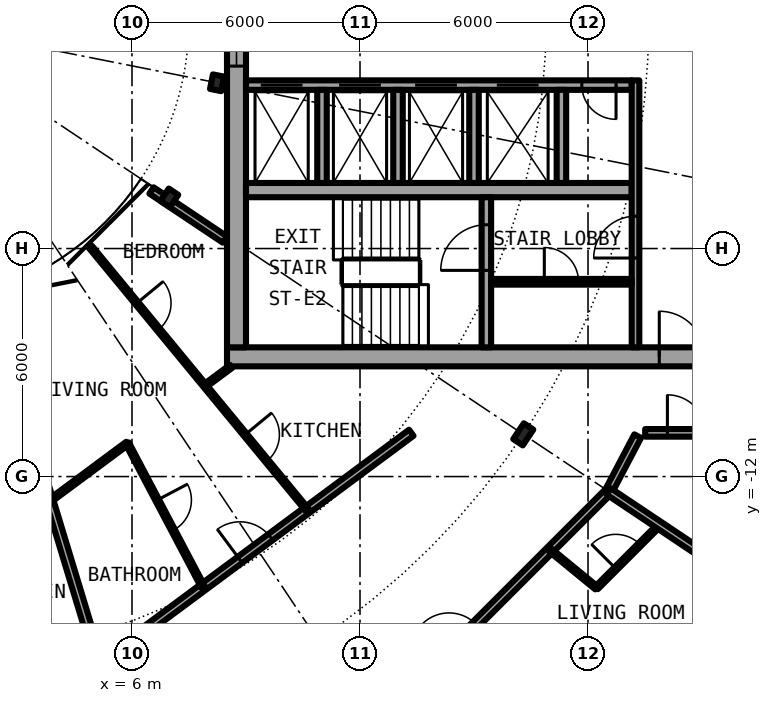
"""IFC4 building model, lengths in metres.
Left out: names, types, materials, properties, quantities, classifications, styles, units other than length and angle.
Written with IfcOpenShell. Run it as: python <this file> out.ifc"""

import sys

from ifc_helpers import new_model, si_unit, direction, frame, frame_2d, origin, origin_2d, place, context, subcontext, project, spatial, rectangle, i_section, extrude, element, fill, save


model = new_model("IFC4")
c1 = context("Model", 3, precision=1e-05, world=origin(), true_north=direction((0.0, 1.0)))
c2 = subcontext(c1, "Body", "Model", "MODEL_VIEW")
j1 = project(units=[si_unit("LENGTHUNIT", "METRE"), si_unit("PLANEANGLEUNIT", "RADIAN")], contexts=[c1])
p1 = place(None, origin())
s1 = spatial("IfcSite", under=j1, at=p1, CompositionType="ELEMENT")
p2 = place(p1, origin())
s2 = spatial("IfcBuilding", under=s1, at=p2, CompositionType="ELEMENT")
p3 = place(p2, frame((0.0, 0.0, 167.7)))
s3 = spatial("IfcBuildingStorey", under=s2, at=p3, CompositionType="ELEMENT", Elevation=167.7)
p4 = place(p3, frame((16.297, -10.889, 0.0), z_axis=(0.0, 0.0, 1.0), x_axis=(0.831469612303, -0.55557023302, 0.0)))
e1 = element("IfcColumn", 1, at=p4, inside=s3, PredefinedType="COLUMN", context=c2, shape_type="SweptSolid", body=[
    extrude(i_section(OverallWidth=0.3, OverallDepth=0.5, WebThickness=0.014, FlangeThickness=0.028, FilletRadius=0.027, at=origin_2d()), origin(), (0.0, 0.0, 1.0), 3.05),
])
for number, where, z_axis, x_axis in (
    (2, (6.984, -4.667, 0.0), (0.0, 0.0, 1.0), (0.831, -0.556, 0.0)),
    (3, (8.239, -1.639, 0.0), (0.0, 0.0, 1.0), (0.981, -0.195, 0.0)),
):
    element("IfcColumn", number, at=place(p3, frame(where, z_axis=z_axis, x_axis=x_axis)), inside=s3, PredefinedType="COLUMN", context=c2, shape_type="SweptSolid", body=[
        extrude(i_section(OverallWidth=0.3, OverallDepth=0.39, WebThickness=0.011, FlangeThickness=0.019, FilletRadius=0.027, at=origin_2d()), origin(), (0.0, 0.0, 1.0), 3.05),
    ])
p5 = place(p3, frame((19.304, -19.304, 0.0), z_axis=(0.0, 0.0, 1.0), x_axis=(0.634382322723, 0.773019449054, 0.0)))
e4 = element("IfcWall", 4, at=p5, inside=s3, PredefinedType="SOLIDWALL", context=c2, shape_type="SweptSolid", body=[
    extrude(rectangle(XDim=5.352, YDim=0.25, at=frame_2d((2.676, 0.0))), origin(), (0.0, 0.0, 1.0), 2.7),
])
p6 = place(p5, frame((0.441, 0.0, 0.3)))
e5 = element("IfcOpeningElement", 5, at=p6, cuts=e4, PredefinedType="OPENING", context=c2, shape_type="SweptSolid", body=[
    extrude(rectangle(XDim=1.8, YDim=2.1, at=frame_2d((0.9, 1.05))), frame((0.0, 0.135, 0.0), z_axis=(0.0, -1.0, 0.0), x_axis=(1.0, 0.0, 0.0)), (0.0, 0.0, 1.0), 0.27),
])
p7 = place(p5, frame((3.51, 0.0, 0.0)))
e6 = element("IfcOpeningElement", 6, at=p7, cuts=e4, PredefinedType="OPENING", context=c2, shape_type="SweptSolid", body=[
    extrude(rectangle(XDim=1.0, YDim=2.2, at=frame_2d((0.5, 1.1))), frame((0.0, 0.135, 0.0), z_axis=(0.0, -1.0, 0.0), x_axis=(1.0, 0.0, 0.0)), (0.0, 0.0, 1.0), 0.27),
])
p8 = place(p3, frame((8.5, -8.85, 0.0), z_axis=(0.0, 0.0, 1.0), x_axis=(1.0, 0.0, 0.0)))
e7 = element("IfcWall", 7, at=p8, inside=s3, PredefinedType="SHEAR", context=c2, shape_type="SweptSolid", body=[
    extrude(rectangle(XDim=13.6, YDim=0.5, at=frame_2d((6.8, 0.0))), origin(), (0.0, 0.0, 1.0), 3.05),
])
p9 = place(p8, frame((11.375, 0.0, 0.0)))
e8 = element("IfcOpeningElement", 8, at=p9, cuts=e7, PredefinedType="OPENING", context=c2, shape_type="SweptSolid", body=[
    extrude(rectangle(XDim=1.2, YDim=2.3, at=frame_2d((0.6, 1.15))), frame((0.0, 0.26, 0.0), z_axis=(0.0, -1.0, 0.0), x_axis=(1.0, 0.0, 0.0)), (0.0, 0.0, 1.0), 0.52),
])
p10 = place(p3, frame((8.75, -8.6, 0.0), z_axis=(0.0, 0.0, 1.0), x_axis=(0.0, 1.0, 0.0)))
e9 = element("IfcWall", 9, at=p10, inside=s3, PredefinedType="SHEAR", context=c2, shape_type="SweptSolid", body=[
    extrude(rectangle(XDim=17.2, YDim=0.5, at=frame_2d((8.6, 0.0))), origin(), (0.0, 0.0, 1.0), 3.05),
])
p11 = place(p10, frame((7.4, 0.0, 0.1)))
e10 = element("IfcOpeningElement", 10, at=p11, cuts=e9, PredefinedType="OPENING", context=c2, shape_type="SweptSolid", body=[
    extrude(rectangle(XDim=2.4, YDim=2.2, at=frame_2d((1.2, 1.1))), frame((0.0, 0.26, 0.0), z_axis=(0.0, -1.0, 0.0), x_axis=(1.0, 0.0, 0.0)), (0.0, 0.0, 1.0), 0.52),
])
p12 = place(p3, frame((19.15, -1.7, 0.0), z_axis=(0.0, 0.0, 1.0), x_axis=(-1.0, 0.0, 0.0)))
e11 = element("IfcWall", 11, at=p12, inside=s3, PredefinedType="SHEAR", context=c2, shape_type="SweptSolid", body=[
    extrude(rectangle(XDim=10.15, YDim=0.25, at=frame_2d((5.075, 0.0))), origin(), (0.0, 0.0, 1.0), 3.05),
])
p13 = place(p12, frame((8.663, 0.0, 0.0)))
e12 = element("IfcOpeningElement", 12, at=p13, cuts=e11, PredefinedType="OPENING", context=c2, shape_type="SweptSolid", body=[
    extrude(rectangle(XDim=1.1, YDim=2.3, at=frame_2d((0.55, 1.15))), frame((0.0, 0.135, 0.0), z_axis=(0.0, -1.0, 0.0), x_axis=(1.0, 0.0, 0.0)), (0.0, 0.0, 1.0), 0.27),
])
p14 = place(p12, frame((6.6, 0.0, 0.0)))
e13 = element("IfcOpeningElement", 13, at=p14, cuts=e11, PredefinedType="OPENING", context=c2, shape_type="SweptSolid", body=[
    extrude(rectangle(XDim=1.1, YDim=2.3, at=frame_2d((0.55, 1.15))), frame((0.0, 0.135, 0.0), z_axis=(0.0, -1.0, 0.0), x_axis=(1.0, 0.0, 0.0)), (0.0, 0.0, 1.0), 0.27),
])
p15 = place(p12, frame((4.6, 0.0, 0.0)))
e14 = element("IfcOpeningElement", 14, at=p15, cuts=e11, PredefinedType="OPENING", context=c2, shape_type="SweptSolid", body=[
    extrude(rectangle(XDim=1.1, YDim=2.3, at=frame_2d((0.55, 1.15))), frame((0.0, 0.135, 0.0), z_axis=(0.0, -1.0, 0.0), x_axis=(1.0, 0.0, 0.0)), (0.0, 0.0, 1.0), 0.27),
])
p16 = place(p12, frame((2.45, 0.0, 0.0)))
e15 = element("IfcOpeningElement", 15, at=p16, cuts=e11, PredefinedType="OPENING", context=c2, shape_type="SweptSolid", body=[
    extrude(rectangle(XDim=1.1, YDim=2.3, at=frame_2d((0.55, 1.15))), frame((0.0, 0.135, 0.0), z_axis=(0.0, -1.0, 0.0), x_axis=(1.0, 0.0, 0.0)), (0.0, 0.0, 1.0), 0.27),
])
p17 = place(p12, frame((0.413, 0.0, 0.0)))
e16 = element("IfcOpeningElement", 16, at=p17, cuts=e11, PredefinedType="OPENING", context=c2, shape_type="SweptSolid", body=[
    extrude(rectangle(XDim=0.9, YDim=2.3, at=frame_2d((0.45, 1.15))), frame((0.0, 0.135, 0.0), z_axis=(0.0, -1.0, 0.0), x_axis=(1.0, 0.0, 0.0)), (0.0, 0.0, 1.0), 0.27),
])
p18 = place(p3, frame((9.0, -4.462, 0.0), z_axis=(0.0, 0.0, 1.0), x_axis=(1.0, 0.0, 0.0)))
e17 = element("IfcWall", 17, at=p18, inside=s3, PredefinedType="SHEAR", context=c2, shape_type="SweptSolid", body=[
    extrude(rectangle(XDim=10.15, YDim=0.375, at=frame_2d((5.075, 0.0))), origin(), (0.0, 0.0, 1.0), 3.05),
])
p19 = place(p3, frame((15.325, -8.6, 0.0), z_axis=(0.0, 0.0, 1.0), x_axis=(0.0, 1.0, 0.0)))
e18 = element("IfcWall", 18, at=p19, inside=s3, PredefinedType="SHEAR", context=c2, shape_type="SweptSolid", body=[
    extrude(rectangle(XDim=3.95, YDim=0.25, at=frame_2d((1.975, 0.0))), origin(), (0.0, 0.0, 1.0), 3.05),
])
p20 = place(p19, frame((2.025, 0.0, 0.0)))
e19 = element("IfcOpeningElement", 19, at=p20, cuts=e18, PredefinedType="OPENING", context=c2, shape_type="SweptSolid", body=[
    extrude(rectangle(XDim=1.2, YDim=2.3, at=frame_2d((0.6, 1.15))), frame((0.0, 0.135, 0.0), z_axis=(0.0, -1.0, 0.0), x_axis=(1.0, 0.0, 0.0)), (0.0, 0.0, 1.0), 0.27),
])
for number, where, z_axis, x_axis in (
    (20, (15.0, -1.825, 0.0), (0.0, 0.0, 1.0), (0.0, -1.0, 0.0)),
    (21, (17.3, -1.825, 0.0), (0.0, 0.0, 1.0), (0.0, -1.0, 0.0)),
):
    element("IfcWall", number, at=place(p3, frame(where, z_axis=z_axis, x_axis=x_axis)), inside=s3, PredefinedType="SOLIDWALL", context=c2, shape_type="SweptSolid", body=[
        extrude(rectangle(XDim=2.45, YDim=0.25, at=frame_2d((1.225, 0.0))), origin(), (0.0, 0.0, 1.0), 2.7),
    ])
p21 = place(p3, frame((19.25, -8.6, 0.0), z_axis=(0.0, 0.0, 1.0), x_axis=(0.0, 1.0, 0.0)))
e22 = element("IfcWall", 22, at=p21, inside=s3, PredefinedType="SOLIDWALL", context=c2, shape_type="SweptSolid", body=[
    extrude(rectangle(XDim=7.025, YDim=0.2, at=frame_2d((3.513, 0.0))), origin(), (0.0, 0.0, 1.0), 2.7),
])
p22 = place(p21, frame((2.35, 0.0, 0.0)))
e23 = element("IfcOpeningElement", 23, at=p22, cuts=e22, PredefinedType="OPENING", context=c2, shape_type="SweptSolid", body=[
    extrude(rectangle(XDim=1.1, YDim=2.3, at=frame_2d((0.55, 1.15))), frame((0.0, 0.11, 0.0), z_axis=(0.0, -1.0, 0.0), x_axis=(1.0, 0.0, 0.0)), (0.0, 0.0, 1.0), 0.22),
])
for number, where, z_axis, x_axis in (
    (24, (11.0, -1.825, 0.0), (0.0, 0.0, 1.0), (0.0, -1.0, 0.0)),
    (25, (13.0, -1.825, 0.0), (0.0, 0.0, 1.0), (0.0, -1.0, 0.0)),
):
    element("IfcWall", number, at=place(p3, frame(where, z_axis=z_axis, x_axis=x_axis)), inside=s3, PredefinedType="SOLIDWALL", context=c2, shape_type="SweptSolid", body=[
        extrude(rectangle(XDim=2.45, YDim=0.25, at=frame_2d((1.225, 0.0))), origin(), (0.0, 0.0, 1.0), 2.7),
    ])
p23 = place(p3, frame((15.45, -6.875, 0.0), z_axis=(0.0, 0.0, 1.0), x_axis=(1.0, 0.0, 0.0)))
e26 = element("IfcWall", 26, at=p23, inside=s3, PredefinedType="PARTITIONING", context=c2, shape_type="SweptSolid", body=[
    extrude(rectangle(XDim=3.7, YDim=0.15, at=frame_2d((1.85, 0.0))), origin(), (0.0, 0.0, 1.0), 2.7),
])
p24 = place(p23, frame((1.4, 0.0, 0.0)))
e27 = element("IfcOpeningElement", 27, at=p24, cuts=e26, PredefinedType="OPENING", context=c2, shape_type="SweptSolid", body=[
    extrude(rectangle(XDim=0.9, YDim=2.3, at=frame_2d((0.45, 1.15))), frame((0.0, 0.085, 0.0), z_axis=(0.0, -1.0, 0.0), x_axis=(1.0, 0.0, 0.0)), (0.0, 0.0, 1.0), 0.17),
])
p25 = place(p3, frame((18.224, -14.927, 0.0), z_axis=(0.0, 0.0, 1.0), x_axis=(0.706897299114, 0.707316201218, 0.0)))
e28 = element("IfcWall", 28, at=p25, inside=s3, PredefinedType="PARTITIONING", context=c2, shape_type="SweptSolid", body=[
    extrude(rectangle(XDim=2.331, YDim=0.1, at=frame_2d((1.166, 0.0))), origin(), (0.0, 0.0, 1.0), 2.7),
])
p26 = place(p25, frame((0.716, 0.0, 0.0)))
e29 = element("IfcOpeningElement", 29, at=p26, cuts=e28, PredefinedType="OPENING", context=c2, shape_type="SweptSolid", body=[
    extrude(rectangle(XDim=0.9, YDim=2.3, at=frame_2d((0.45, 1.15))), frame((0.0, 0.06, 0.0), z_axis=(0.0, -1.0, 0.0), x_axis=(1.0, 0.0, 0.0)), (0.0, 0.0, 1.0), 0.12),
])
p27 = place(p3, frame((18.542, -12.389, 0.0), z_axis=(0.0, 0.0, 1.0), x_axis=(0.465605550524, 0.884992356646, 0.0)))
e30 = element("IfcWall", 30, at=p27, inside=s3, PredefinedType="PARTITIONING", context=c2, shape_type="SweptSolid", body=[
    extrude(rectangle(XDim=1.643, YDim=0.2, at=frame_2d((0.821, 0.0))), origin(), (0.0, 0.0, 1.0), 2.7),
])
p28 = place(p3, frame((12.389, -18.542, 0.0), z_axis=(0.0, 0.0, 1.0), x_axis=(0.707106781187, 0.707106781187, 0.0)))
e31 = element("IfcWall", 31, at=p28, inside=s3, PredefinedType="PARTITIONING", context=c2, shape_type="SweptSolid", body=[
    extrude(rectangle(XDim=8.702, YDim=0.2, at=frame_2d((4.351, 0.0))), origin(), (0.0, 0.0, 1.0), 2.7),
])
p29 = place(p28, frame((2.763, 0.0, 0.0)))
e32 = element("IfcOpeningElement", 32, at=p29, cuts=e31, PredefinedType="OPENING", context=c2, shape_type="SweptSolid", body=[
    extrude(rectangle(XDim=1.0, YDim=2.3, at=frame_2d((0.5, 1.15))), frame((0.0, 0.11, 0.0), z_axis=(0.0, -1.0, 0.0), x_axis=(1.0, 0.0, 0.0)), (0.0, 0.0, 1.0), 0.22),
])
p30 = place(p3, frame((5.137, -16.938, 0.0), z_axis=(0.0, 0.0, 1.0), x_axis=(0.803229232922, 0.595670042371, 0.0)))
e33 = element("IfcWall", 33, at=p30, inside=s3, PredefinedType="PARTITIONING", context=c2, shape_type="SweptSolid", body=[
    extrude(rectangle(XDim=10.224, YDim=0.2, at=frame_2d((5.112, 0.0))), origin(), (0.0, 0.0, 1.0), 2.7),
])
p31 = place(p30, frame((4.612, 0.0, 0.0)))
e34 = element("IfcOpeningElement", 34, at=p31, cuts=e33, PredefinedType="OPENING", context=c2, shape_type="SweptSolid", body=[
    extrude(rectangle(XDim=1.0, YDim=2.3, at=frame_2d((0.5, 1.15))), frame((0.0, 0.11, 0.0), z_axis=(0.0, -1.0, 0.0), x_axis=(1.0, 0.0, 0.0)), (0.0, 0.0, 1.0), 0.22),
])
p32 = place(p3, frame((3.835, -12.64, 0.0), z_axis=(0.0, 0.0, 1.0), x_axis=(0.803259509791, 0.595629213463, 0.0)))
e35 = element("IfcWall", 35, at=p32, inside=s3, PredefinedType="PARTITIONING", context=c2, shape_type="SweptSolid", body=[
    extrude(rectangle(XDim=2.543, YDim=0.1, at=frame_2d((1.272, 0.0))), origin(), (0.0, 0.0, 1.0), 2.7),
])
p33 = place(p3, frame((7.919, -9.611, 0.0), z_axis=(0.0, 0.0, 1.0), x_axis=(0.803199066515, 0.595710718007, 0.0)))
e36 = element("IfcWall", 36, at=p33, inside=s3, PredefinedType="PARTITIONING", context=c2, shape_type="SweptSolid", body=[
    extrude(rectangle(XDim=0.858, YDim=0.1, at=frame_2d((0.429, 0.0))), origin(), (0.0, 0.0, 1.0), 2.7),
])
p34 = place(p3, frame((19.504, -10.85, 0.0), z_axis=(0.0, 0.0, 1.0), x_axis=(1.0, 0.0, 0.0)))
e37 = element("IfcWall", 37, at=p34, inside=s3, PredefinedType="PARTITIONING", context=c2, shape_type="SweptSolid", body=[
    extrude(rectangle(XDim=2.171, YDim=0.2, at=frame_2d((1.085, 0.0))), origin(), (0.0, 0.0, 1.0), 2.7),
])
p35 = place(p34, frame((0.585, 0.0, 0.0)))
e38 = element("IfcOpeningElement", 38, at=p35, cuts=e37, PredefinedType="OPENING", context=c2, shape_type="SweptSolid", body=[
    extrude(rectangle(XDim=1.0, YDim=2.3, at=frame_2d((0.5, 1.15))), frame((0.0, 0.11, 0.0), z_axis=(0.0, -1.0, 0.0), x_axis=(1.0, 0.0, 0.0)), (0.0, 0.0, 1.0), 0.22),
])
p36 = place(p3, frame((6.513, -4.472, 0.0), z_axis=(0.0, 0.0, 1.0), x_axis=(0.83133816625, -0.555766905579, 0.0)))
e39 = element("IfcWall", 39, at=p36, inside=s3, PredefinedType="PARTITIONING", context=c2, shape_type="SweptSolid", body=[
    extrude(rectangle(XDim=2.323, YDim=0.2, at=frame_2d((1.162, 0.0))), origin(), (0.0, 0.0, 1.0), 2.7),
])
p37 = place(p3, frame((2.241, -7.388, 0.0), z_axis=(0.0, 0.0, 1.0), x_axis=(0.290284403441, -0.956940418793, 0.0)))
e40 = element("IfcWall", 40, at=p37, inside=s3, PredefinedType="PARTITIONING", context=c2, shape_type="SweptSolid", body=[
    extrude(rectangle(XDim=9.98, YDim=0.2, at=frame_2d((4.99, 0.0))), origin(), (0.0, 0.0, 1.0), 2.7),
])
p38 = place(p3, frame((4.908, -5.959, 0.0), z_axis=(0.0, 0.0, 1.0), x_axis=(0.636115614725, -0.771593756262, 0.0)))
e41 = element("IfcWall", 41, at=p38, inside=s3, PredefinedType="PARTITIONING", context=c2, shape_type="SweptSolid", body=[
    extrude(rectangle(XDim=8.967, YDim=0.1, at=frame_2d((4.483, 0.0))), origin(), (0.0, 0.0, 1.0), 2.7),
])
p39 = place(p38, frame((6.4, 0.0, 0.0)))
e42 = element("IfcOpeningElement", 42, at=p39, cuts=e41, PredefinedType="OPENING", context=c2, shape_type="SweptSolid", body=[
    extrude(rectangle(XDim=0.9, YDim=2.3, at=frame_2d((0.45, 1.15))), frame((0.0, 0.06, 0.0), z_axis=(0.0, -1.0, 0.0), x_axis=(1.0, 0.0, 0.0)), (0.0, 0.0, 1.0), 0.12),
])
p40 = place(p38, frame((1.917, 0.0, 0.0)))
e43 = element("IfcOpeningElement", 43, at=p40, cuts=e41, PredefinedType="OPENING", context=c2, shape_type="SweptSolid", body=[
    extrude(rectangle(XDim=0.9, YDim=2.3, at=frame_2d((0.45, 1.15))), frame((0.0, 0.06, 0.0), z_axis=(0.0, -1.0, 0.0), x_axis=(1.0, 0.0, 0.0)), (0.0, 0.0, 1.0), 0.12),
])
p41 = place(p3, frame((5.875, -11.126, 0.0), z_axis=(0.0, 0.0, 1.0), x_axis=(0.467030118529, -0.884241408432, 0.0)))
e44 = element("IfcWall", 44, at=p41, inside=s3, PredefinedType="PARTITIONING", context=c2, shape_type="SweptSolid", body=[
    extrude(rectangle(XDim=4.278, YDim=0.1, at=frame_2d((2.139, 0.0))), origin(), (0.0, 0.0, 1.0), 2.7),
])
p42 = place(p41, frame((1.689, 0.0, 0.0)))
e45 = element("IfcOpeningElement", 45, at=p42, cuts=e44, PredefinedType="OPENING", context=c2, shape_type="SweptSolid", body=[
    extrude(rectangle(XDim=0.9, YDim=2.3, at=frame_2d((0.45, 1.15))), frame((0.0, 0.06, 0.0), z_axis=(0.0, -1.0, 0.0), x_axis=(1.0, 0.0, 0.0)), (0.0, 0.0, 1.0), 0.12),
])
p43 = place(p3, frame((17.001, -13.93, 0.0), z_axis=(0.0, 0.0, 1.0), x_axis=(0.773633255921, -0.633633636523, 0.0)))
e46 = element("IfcWall", 46, at=p43, inside=s3, PredefinedType="PARTITIONING", context=c2, shape_type="SweptSolid", body=[
    extrude(rectangle(XDim=1.578, YDim=0.1, at=frame_2d((0.789, 0.0))), origin(), (0.0, 0.0, 1.0), 2.7),
])
p44 = place(p3, frame((18.542, -12.389, 0.0), z_axis=(0.0, 0.0, 1.0), x_axis=(0.831387096605, -0.55569370664, 0.0)))
e47 = element("IfcWall", 47, at=p44, inside=s3, PredefinedType="PARTITIONING", context=c2, shape_type="SweptSolid", body=[
    extrude(rectangle(XDim=4.875, YDim=0.2, at=frame_2d((2.438, 0.0))), origin(), (0.0, 0.0, 1.0), 2.7),
])
p45 = place(p13, origin())
e48 = element("IfcDoor", 48, at=p45, inside=s3, OperationType="DOUBLE_DOOR_SLIDING", PredefinedType="DOOR", context=c2, shape_type="SweptSolid", body=[
    extrude(rectangle(XDim=1.1, YDim=2.3, at=frame_2d((0.55, 1.15))), frame((0.0, 0.025, 0.0), z_axis=(0.0, -1.0, 0.0), x_axis=(1.0, 0.0, 0.0)), (0.0, 0.0, 1.0), 0.05),
])
fill(e12, e48)
p46 = place(p14, origin())
e49 = element("IfcDoor", 49, at=p46, inside=s3, OperationType="DOUBLE_DOOR_SLIDING", PredefinedType="DOOR", context=c2, shape_type="SweptSolid", body=[
    extrude(rectangle(XDim=1.1, YDim=2.3, at=frame_2d((0.55, 1.15))), frame((0.0, 0.025, 0.0), z_axis=(0.0, -1.0, 0.0), x_axis=(1.0, 0.0, 0.0)), (0.0, 0.0, 1.0), 0.05),
])
fill(e13, e49)
p47 = place(p15, origin())
e50 = element("IfcDoor", 50, at=p47, inside=s3, OperationType="DOUBLE_DOOR_SLIDING", PredefinedType="DOOR", context=c2, shape_type="SweptSolid", body=[
    extrude(rectangle(XDim=1.1, YDim=2.3, at=frame_2d((0.55, 1.15))), frame((0.0, 0.025, 0.0), z_axis=(0.0, -1.0, 0.0), x_axis=(1.0, 0.0, 0.0)), (0.0, 0.0, 1.0), 0.05),
])
fill(e14, e50)
p48 = place(p16, origin())
e51 = element("IfcDoor", 51, at=p48, inside=s3, OperationType="DOUBLE_DOOR_SLIDING", PredefinedType="DOOR", context=c2, shape_type="SweptSolid", body=[
    extrude(rectangle(XDim=1.1, YDim=2.3, at=frame_2d((0.55, 1.15))), frame((0.0, 0.025, 0.0), z_axis=(0.0, -1.0, 0.0), x_axis=(1.0, 0.0, 0.0)), (0.0, 0.0, 1.0), 0.05),
])
fill(e15, e51)
p49 = place(p17, origin())
e52 = element("IfcDoor", 52, at=p49, inside=s3, OperationType="SINGLE_SWING_RIGHT", PredefinedType="DOOR", context=c2, shape_type="SweptSolid", body=[
    extrude(rectangle(XDim=0.9, YDim=2.3, at=frame_2d((0.45, 1.15))), frame((0.0, 0.025, 0.0), z_axis=(0.0, -1.0, 0.0), x_axis=(1.0, 0.0, 0.0)), (0.0, 0.0, 1.0), 0.05),
])
fill(e16, e52)
p50 = place(p24, origin())
e53 = element("IfcDoor", 53, at=p50, inside=s3, OperationType="SINGLE_SWING_LEFT", PredefinedType="DOOR", context=c2, shape_type="SweptSolid", body=[
    extrude(rectangle(XDim=0.9, YDim=2.3, at=frame_2d((0.45, 1.15))), frame((0.0, 0.025, 0.0), z_axis=(0.0, -1.0, 0.0), x_axis=(1.0, 0.0, 0.0)), (0.0, 0.0, 1.0), 0.05),
])
fill(e27, e53)
p51 = place(p20, origin())
e54 = element("IfcDoor", 54, at=p51, inside=s3, OperationType="SINGLE_SWING_LEFT", PredefinedType="DOOR", context=c2, shape_type="SweptSolid", body=[
    extrude(rectangle(XDim=1.2, YDim=2.3, at=frame_2d((0.6, 1.15))), frame((0.0, 0.025, 0.0), z_axis=(0.0, -1.0, 0.0), x_axis=(1.0, 0.0, 0.0)), (0.0, 0.0, 1.0), 0.05),
])
fill(e19, e54)
p52 = place(p22, origin())
e55 = element("IfcDoor", 55, at=p52, inside=s3, OperationType="SINGLE_SWING_RIGHT", PredefinedType="DOOR", context=c2, shape_type="SweptSolid", body=[
    extrude(rectangle(XDim=1.1, YDim=2.3, at=frame_2d((0.55, 1.15))), frame((0.0, 0.025, 0.0), z_axis=(0.0, -1.0, 0.0), x_axis=(1.0, 0.0, 0.0)), (0.0, 0.0, 1.0), 0.05),
])
fill(e23, e55)
p53 = place(p9, origin())
e56 = element("IfcDoor", 56, at=p53, inside=s3, OperationType="SINGLE_SWING_LEFT", PredefinedType="DOOR", context=c2, shape_type="SweptSolid", body=[
    extrude(rectangle(XDim=1.2, YDim=2.3, at=frame_2d((0.6, 1.15))), frame((0.0, 0.025, 0.0), z_axis=(0.0, -1.0, 0.0), x_axis=(1.0, 0.0, 0.0)), (0.0, 0.0, 1.0), 0.05),
])
fill(e8, e56)
p54 = place(p11, origin())
e57 = element("IfcWindow", 57, at=p54, inside=s3, PartitioningType="SINGLE_PANEL", PredefinedType="WINDOW", context=c2, shape_type="SweptSolid", body=[
    extrude(rectangle(XDim=2.4, YDim=2.2, at=frame_2d((1.2, 1.1))), frame((0.0, 0.03, 0.0), z_axis=(0.0, -1.0, 0.0), x_axis=(1.0, 0.0, 0.0)), (0.0, 0.0, 1.0), 0.06),
])
fill(e10, e57)
p55 = place(p26, origin())
e58 = element("IfcDoor", 58, at=p55, inside=s3, OperationType="SINGLE_SWING_RIGHT", PredefinedType="DOOR", context=c2, shape_type="SweptSolid", body=[
    extrude(rectangle(XDim=0.9, YDim=2.3, at=frame_2d((0.45, 1.15))), frame((0.0, 0.025, 0.0), z_axis=(0.0, -1.0, 0.0), x_axis=(1.0, 0.0, 0.0)), (0.0, 0.0, 1.0), 0.05),
])
fill(e29, e58)
p56 = place(p31, origin())
e59 = element("IfcDoor", 59, at=p56, inside=s3, OperationType="SINGLE_SWING_RIGHT", PredefinedType="DOOR", context=c2, shape_type="SweptSolid", body=[
    extrude(rectangle(XDim=1.0, YDim=2.3, at=frame_2d((0.5, 1.15))), frame((0.0, 0.025, 0.0), z_axis=(0.0, -1.0, 0.0), x_axis=(1.0, 0.0, 0.0)), (0.0, 0.0, 1.0), 0.05),
])
fill(e34, e59)
p57 = place(p42, origin())
e60 = element("IfcDoor", 60, at=p57, inside=s3, OperationType="SINGLE_SWING_RIGHT", PredefinedType="DOOR", context=c2, shape_type="SweptSolid", body=[
    extrude(rectangle(XDim=0.9, YDim=2.3, at=frame_2d((0.45, 1.15))), frame((0.0, 0.025, 0.0), z_axis=(0.0, -1.0, 0.0), x_axis=(1.0, 0.0, 0.0)), (0.0, 0.0, 1.0), 0.05),
])
fill(e45, e60)
p58 = place(p39, origin())
e61 = element("IfcDoor", 61, at=p58, inside=s3, OperationType="SINGLE_SWING_RIGHT", PredefinedType="DOOR", context=c2, shape_type="SweptSolid", body=[
    extrude(rectangle(XDim=0.9, YDim=2.3, at=frame_2d((0.45, 1.15))), frame((0.0, 0.025, 0.0), z_axis=(0.0, -1.0, 0.0), x_axis=(1.0, 0.0, 0.0)), (0.0, 0.0, 1.0), 0.05),
])
fill(e42, e61)
p59 = place(p40, origin())
e62 = element("IfcDoor", 62, at=p59, inside=s3, OperationType="SINGLE_SWING_LEFT", PredefinedType="DOOR", context=c2, shape_type="SweptSolid", body=[
    extrude(rectangle(XDim=0.9, YDim=2.3, at=frame_2d((0.45, 1.15))), frame((0.0, 0.025, 0.0), z_axis=(0.0, -1.0, 0.0), x_axis=(1.0, 0.0, 0.0)), (0.0, 0.0, 1.0), 0.05),
])
fill(e43, e62)
p60 = place(p35, origin())
e63 = element("IfcDoor", 63, at=p60, inside=s3, OperationType="SINGLE_SWING_LEFT", PredefinedType="DOOR", context=c2, shape_type="SweptSolid", body=[
    extrude(rectangle(XDim=1.0, YDim=2.3, at=frame_2d((0.5, 1.15))), frame((0.0, 0.025, 0.0), z_axis=(0.0, -1.0, 0.0), x_axis=(1.0, 0.0, 0.0)), (0.0, 0.0, 1.0), 0.05),
])
fill(e38, e63)
save(model, sys.argv[1])
